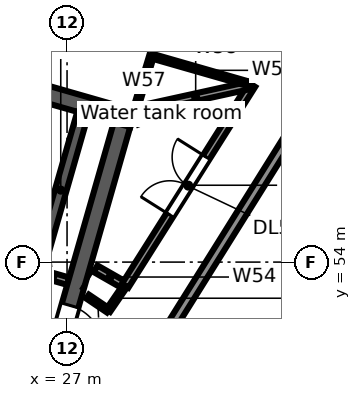
"""IFC4 building model, lengths in metres.
Left out: names, types, materials, properties, quantities, classifications, styles, units other than length and angle.
Written with IfcOpenShell. Run it as: python <this file> out.ifc"""

import sys

from ifc_helpers import new_model, si_unit, direction, frame, frame_2d, origin, place, context, subcontext, project, spatial, rectangle, extrude, element, fill, save


model = new_model("IFC4")
c1 = context("Model", 3, precision=1e-05, world=origin(), true_north=direction((0.0, 1.0)))
c2 = subcontext(c1, "Body", "Model", "MODEL_VIEW")
j1 = project(units=[si_unit("LENGTHUNIT", "METRE"), si_unit("PLANEANGLEUNIT", "RADIAN")], contexts=[c1])
p1 = place(None, origin())
s1 = spatial("IfcSite", under=j1, at=p1, CompositionType="ELEMENT")
p2 = place(p1, origin())
s2 = spatial("IfcBuilding", under=s1, at=p2, CompositionType="ELEMENT")
p3 = place(p2, frame((0.0, 0.0, 258.2)))
s3 = spatial("IfcBuildingStorey", under=s2, at=p3, CompositionType="ELEMENT", Elevation=258.2)
p4 = place(p3, frame((34.364, 59.711, 0.0), z_axis=(0.0, 0.0, 1.0), x_axis=(-0.529923238965, -0.848045612455, 0.0)))
e1 = element("IfcWall", 1, at=p4, inside=s3, PredefinedType="STANDARD", context=c2, shape_type="SweptSolid", body=[
    extrude(rectangle(XDim=18.554, YDim=0.25, at=frame_2d((9.277, 0.0))), origin(), (0.0, 0.0, 1.0), 4.22),
])
p5 = place(p3, frame((3.135, 68.5, 0.0), z_axis=(0.0, 0.0, 1.0), x_axis=(0.961262369705, -0.275635006103, 0.0)))
e2 = element("IfcWall", 2, at=p5, inside=s3, PredefinedType="STANDARD", context=c2, shape_type="SweptSolid", body=[
    extrude(rectangle(XDim=32.562, YDim=0.25, at=frame_2d((16.281, 0.0))), origin(), (0.0, 0.0, 1.0), 3.52),
])
p6 = place(p3, frame((26.214, 53.732, 0.0), z_axis=(0.0, 0.0, 1.0), x_axis=(0.961241665642, -0.275707200184, 0.0)))
e3 = element("IfcWall", 3, at=p6, inside=s3, PredefinedType="SOLIDWALL", context=c2, shape_type="SweptSolid", body=[
    extrude(rectangle(XDim=0.85, YDim=0.2, at=frame_2d((0.425, 0.0))), origin(), (0.0, 0.0, 1.0), 4.22),
])
p7 = place(p3, frame((20.073, 60.252, 0.0), z_axis=(0.0, 0.0, 1.0), x_axis=(0.96126248289, -0.275634611374, 0.0)))
e4 = element("IfcWall", 4, at=p7, inside=s3, PredefinedType="SOLIDWALL", context=c2, shape_type="SweptSolid", body=[
    extrude(rectangle(XDim=9.0, YDim=0.45, at=frame_2d((4.5, 0.0))), origin(), (0.0, 0.0, 1.0), 4.22),
])
p8 = place(p3, frame((26.256, 53.876, 0.0), z_axis=(0.0, 0.0, 1.0), x_axis=(0.275588560745, 0.96127568636, 0.0)))
e5 = element("IfcWall", 5, at=p8, inside=s3, PredefinedType="SOLIDWALL", context=c2, shape_type="SweptSolid", body=[
    extrude(rectangle(XDim=4.2, YDim=0.3, at=frame_2d((2.1, 0.0))), origin(), (0.0, 0.0, 1.0), 4.22),
])
p9 = place(p3, frame((25.387, 46.947, 0.0), z_axis=(0.0, 0.0, 1.0), x_axis=(0.275638974822, 0.961261231695, 0.0)))
e6 = element("IfcWall", 6, at=p9, inside=s3, PredefinedType="SOLIDWALL", context=c2, shape_type="SweptSolid", body=[
    extrude(rectangle(XDim=11.1, YDim=0.45, at=frame_2d((5.55, 0.0))), origin(), (0.0, 0.0, 1.0), 4.22),
])
p10 = place(p9, frame((4.95, 0.0, 0.0)))
e7 = element("IfcOpeningElement", 7, at=p10, cuts=e6, PredefinedType="OPENING", context=c2, shape_type="SweptSolid", body=[
    extrude(rectangle(XDim=1.2, YDim=2.1, at=frame_2d((0.6, 1.05))), frame((0.0, 0.235, 0.0), z_axis=(0.0, -1.0, 0.0), x_axis=(1.0, 0.0, 0.0)), (0.0, 0.0, 1.0), 0.47),
])
p11 = place(p3, frame((27.54, 53.093, 0.0), z_axis=(0.0, 0.0, 1.0), x_axis=(0.829228861546, -0.558909201195, 0.0)))
e8 = element("IfcWall", 8, at=p11, inside=s3, PredefinedType="PARTITIONING", context=c2, shape_type="SweptSolid", body=[
    extrude(rectangle(XDim=0.655, YDim=0.125, at=frame_2d((0.327, 0.0))), origin(), (0.0, 0.0, 1.0), 4.22),
])
p12 = place(p3, frame((27.75, 53.825, 0.0), z_axis=(0.0, 0.0, 1.0), x_axis=(0.868208945987, -0.49619877681, 0.0)))
e9 = element("IfcWall", 9, at=p12, inside=s3, PredefinedType="PARTITIONING", context=c2, shape_type="SweptSolid", body=[
    extrude(rectangle(XDim=0.879, YDim=0.2, at=frame_2d((0.439, 0.0))), origin(), (0.0, 0.0, 1.0), 4.22),
])
p13 = place(p3, frame((28.083, 52.727, 0.0), z_axis=(0.0, 0.0, 1.0), x_axis=(0.565759162709, 0.824570536589, 0.0)))
e10 = element("IfcWall", 10, at=p13, inside=s3, PredefinedType="PARTITIONING", context=c2, shape_type="SweptSolid", body=[
    extrude(rectangle(XDim=0.781, YDim=0.125, at=frame_2d((0.391, 0.0))), origin(), (0.0, 0.0, 1.0), 3.971),
])
p14 = place(p3, frame((28.53, 53.38, 0.0), z_axis=(0.0, 0.0, 1.0), x_axis=(0.533757818775, 0.845637387357, 0.0)))
e11 = element("IfcWall", 11, at=p14, inside=s3, PredefinedType="PARTITIONING", context=c2, shape_type="SweptSolid", body=[
    extrude(rectangle(XDim=6.25, YDim=0.2, at=frame_2d((3.125, 0.0))), origin(), (0.0, 0.0, 1.0), 4.22),
])
p15 = place(p14, frame((2.2, 0.0, 0.0)))
e12 = element("IfcOpeningElement", 12, at=p15, cuts=e11, PredefinedType="OPENING", context=c2, shape_type="SweptSolid", body=[
    extrude(rectangle(XDim=1.8, YDim=2.1, at=frame_2d((0.9, 1.05))), frame((0.0, 0.11, 0.0), z_axis=(0.0, -1.0, 0.0), x_axis=(1.0, 0.0, 0.0)), (0.0, 0.0, 1.0), 0.22),
])
p16 = place(p3, frame((28.83, 58.131, 0.0), z_axis=(0.0, 0.0, 1.0), x_axis=(0.290895420136, 0.956754856034, 0.0)))
e13 = element("IfcWall", 13, at=p16, inside=s3, PredefinedType="PARTITIONING", context=c2, shape_type="SweptSolid", body=[
    extrude(rectangle(XDim=1.35, YDim=0.125, at=frame_2d((0.675, 0.0))), origin(), (0.0, 0.0, 1.0), 4.22),
])
p17 = place(p3, frame((28.933, 58.02, 0.0), z_axis=(0.0, 0.0, 1.0), x_axis=(0.976692706785, 0.214642392164, 0.0)))
e14 = element("IfcWall", 14, at=p17, inside=s3, PredefinedType="PARTITIONING", context=c2, shape_type="SweptSolid", body=[
    extrude(rectangle(XDim=2.972, YDim=0.2, at=frame_2d((1.486, 0.0))), origin(), (0.0, 0.0, 1.0), 3.971),
])
p18 = place(p3, frame((29.223, 59.423, 0.0), z_axis=(0.0, 0.0, 1.0), x_axis=(0.96116189926, -0.275985150709, 0.0)))
e15 = element("IfcWall", 15, at=p18, inside=s3, PredefinedType="PARTITIONING", context=c2, shape_type="SweptSolid", body=[
    extrude(rectangle(XDim=2.729, YDim=0.125, at=frame_2d((1.365, 0.0))), origin(), (0.0, 0.0, 1.0), 3.971),
])
p19 = place(p10, frame((1.2, 0.0, 0.0), z_axis=(0.0, 0.0, 1.0), x_axis=(-1.0, 0.0, 0.0)))
e16 = element("IfcDoor", 16, at=p19, inside=s3, OperationType="SINGLE_SWING_RIGHT", PredefinedType="DOOR", context=c2, shape_type="SweptSolid", body=[
    extrude(rectangle(XDim=1.2, YDim=2.1, at=frame_2d((0.6, 1.05))), frame((0.0, 0.025, 0.0), z_axis=(0.0, -1.0, 0.0), x_axis=(1.0, 0.0, 0.0)), (0.0, 0.0, 1.0), 0.05),
])
fill(e7, e16)
p20 = place(p15, origin())
e17 = element("IfcDoor", 17, at=p20, inside=s3, OperationType="DOUBLE_DOOR_SINGLE_SWING", PredefinedType="DOOR", context=c2, shape_type="SweptSolid", body=[
    extrude(rectangle(XDim=1.8, YDim=2.1, at=frame_2d((0.9, 1.05))), frame((0.0, 0.025, 0.0), z_axis=(0.0, -1.0, 0.0), x_axis=(1.0, 0.0, 0.0)), (0.0, 0.0, 1.0), 0.05),
])
fill(e12, e17)
save(model, sys.argv[1])
